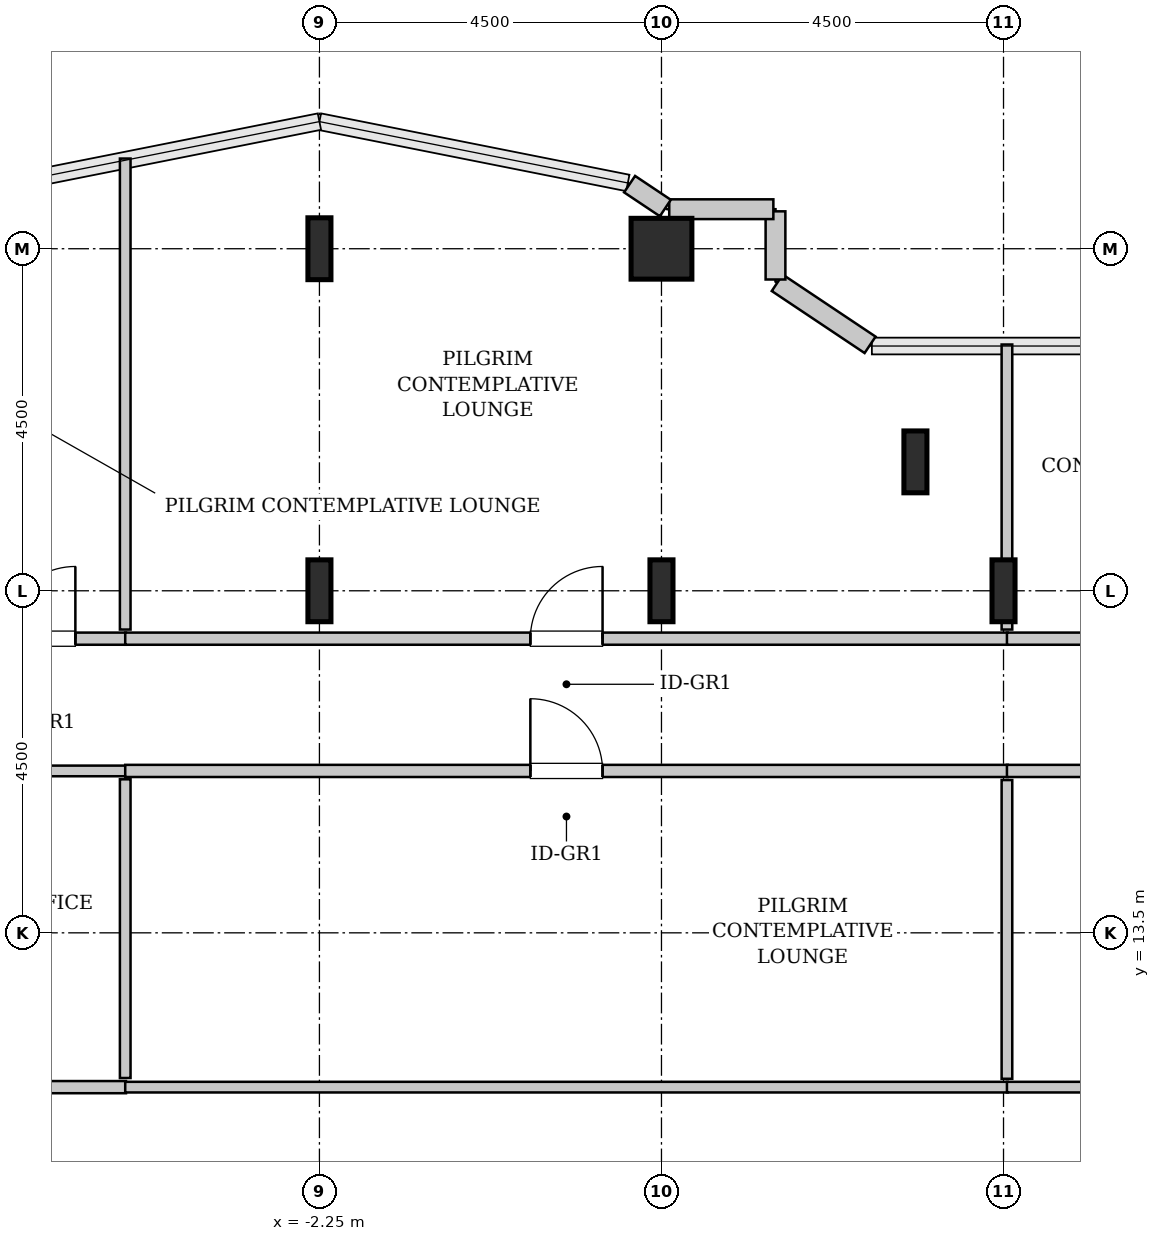
"""IFC4 building model, lengths in metres.
Left out: names, types, materials, properties, quantities, classifications, styles, units other than length and angle.
Written with IfcOpenShell. Run it as: python <this file> out.ifc"""

import sys

from ifc_helpers import new_model, si_unit, direction, frame, frame_2d, origin, origin_2d, place, context, subcontext, project, spatial, rectangle, hollow_rectangle, i_section, extrude, source, transform, mapped, element, fill, save


model = new_model("IFC4")
c1 = context("Model", 3, precision=1e-05, world=origin(), true_north=direction((0.0, 1.0)))
c2 = subcontext(c1, "Body", "Model", "MODEL_VIEW")
j1 = project(units=[si_unit("LENGTHUNIT", "METRE"), si_unit("PLANEANGLEUNIT", "RADIAN")], contexts=[c1])
p1 = place(None, origin())
s1 = spatial("IfcSite", under=j1, at=p1, CompositionType="ELEMENT")
p2 = place(p1, origin())
s2 = spatial("IfcBuilding", under=s1, at=p2, CompositionType="ELEMENT")
p3 = place(p2, frame((0.0, 0.0, 160.2)))
s3 = spatial("IfcBuildingStorey", under=s2, at=p3, CompositionType="ELEMENT", Elevation=160.2)
m1 = source(origin(), c2, "Body", "SweptSolid", [
    extrude(i_section(OverallWidth=0.303, OverallDepth=0.814, WebThickness=0.021, FlangeThickness=0.04, FilletRadius=0.03, at=origin_2d()), origin(), (0.0, 0.0, 1.0), 3.8),
])
for number, where, z_axis, x_axis in (
    (1, (-2.25, 18.0, 0.0), (0.0, 0.0, 1.0), (1.0, 0.0, 0.0)),
    (2, (-2.25, 22.5, 0.0), (0.0, 0.0, 1.0), (1.0, 0.0, 0.0)),
    (3, (2.25, 18.0, 0.0), (0.0, 0.0, 1.0), (1.0, 0.0, 0.0)),
):
    element("IfcColumn", number, at=place(p3, frame(where, z_axis=z_axis, x_axis=x_axis)), inside=s3, PredefinedType="COLUMN", context=c2, shape_type="MappedRepresentation", body=[
        mapped(m1, transform((0.0, 0.0, 0.0), x_axis=(1.0, 0.0, 0.0), y_axis=(0.0, 1.0, 0.0), z_axis=(0.0, 0.0, 1.0), scale=1.0)),
    ])
m2 = source(origin(), c2, "Body", "SweptSolid", [
    extrude(hollow_rectangle(XDim=0.8, YDim=0.8, WallThickness=0.04, InnerFilletRadius=0.04, OuterFilletRadius=0.08, at=origin_2d()), origin(), (0.0, 0.0, 1.0), 3.8),
])
p4 = place(p3, frame((2.25, 22.5, 0.0), z_axis=(0.0, 0.0, 1.0), x_axis=(1.0, 0.0, 0.0)))
e4 = element("IfcColumn", 4, at=p4, inside=s3, PredefinedType="COLUMN", context=c2, shape_type="MappedRepresentation", body=[
    mapped(m2, transform((0.0, 0.0, 0.0), x_axis=(1.0, 0.0, 0.0), y_axis=(0.0, 1.0, 0.0), z_axis=(0.0, 0.0, 1.0), scale=1.0)),
])
for number, where, z_axis, x_axis in (
    (5, (5.591, 19.696, 0.0), (0.0, 0.0, 1.0), (1.0, 0.0, 0.0)),
    (6, (6.75, 18.0, 0.0), (0.0, 0.0, 1.0), (1.0, 0.0, 0.0)),
):
    element("IfcColumn", number, at=place(p3, frame(where, z_axis=z_axis, x_axis=x_axis)), inside=s3, PredefinedType="COLUMN", context=c2, shape_type="MappedRepresentation", body=[
        mapped(m1, transform((0.0, 0.0, 0.0), x_axis=(1.0, 0.0, 0.0), y_axis=(0.0, 1.0, 0.0), z_axis=(0.0, 0.0, 1.0), scale=1.0)),
    ])
m3 = source(origin(), c2, "Body", "SweptSolid", [
    extrude(rectangle(XDim=1.469, YDim=0.26, at=frame_2d((0.734, 0.0))), origin(), (0.0, 0.0, 1.0), 3.55),
])
p5 = place(p3, frame((4.995, 21.236, 0.0), z_axis=(0.0, 0.0, 1.0), x_axis=(-0.831461760506, 0.555581983884, 0.0)))
e7 = element("IfcWall", 7, at=p5, inside=s3, PredefinedType="SOLIDWALL", context=c2, shape_type="MappedRepresentation", body=[
    mapped(m3, transform((0.0, 0.0, 0.0), x_axis=(1.0, 0.0, 0.0), y_axis=(0.0, 1.0, 0.0), z_axis=(0.0, 0.0, 1.0), scale=1.0)),
])
m4 = source(origin(), c2, "Body", "SweptSolid", [
    extrude(rectangle(XDim=0.897, YDim=0.26, at=frame_2d((0.448, 0.0))), origin(), (0.0, 0.0, 1.0), 3.55),
])
p6 = place(p3, frame((3.75, 22.095, 0.0), z_axis=(0.0, 0.0, 1.0), x_axis=(0.0, 1.0, 0.0)))
e8 = element("IfcWall", 8, at=p6, inside=s3, PredefinedType="SOLIDWALL", context=c2, shape_type="MappedRepresentation", body=[
    mapped(m4, transform((0.0, 0.0, 0.0), x_axis=(1.0, 0.0, 0.0), y_axis=(0.0, 1.0, 0.0), z_axis=(0.0, 0.0, 1.0), scale=1.0)),
])
m5 = source(origin(), c2, "Body", "SweptSolid", [
    extrude(rectangle(XDim=1.37, YDim=0.26, at=frame_2d((0.685, 0.0))), origin(), (0.0, 0.0, 1.0), 3.55),
])
p7 = place(p3, frame((3.722, 23.02, 0.0), z_axis=(0.0, 0.0, 1.0), x_axis=(-1.0, 0.0, 0.0)))
e9 = element("IfcWall", 9, at=p7, inside=s3, PredefinedType="SOLIDWALL", context=c2, shape_type="MappedRepresentation", body=[
    mapped(m5, transform((0.0, 0.0, 0.0), x_axis=(1.0, 0.0, 0.0), y_axis=(0.0, 1.0, 0.0), z_axis=(0.0, 0.0, 1.0), scale=1.0)),
])
m6 = source(origin(), c2, "Body", "SweptSolid", [
    extrude(rectangle(XDim=0.565, YDim=0.26, at=frame_2d((0.283, 0.0))), origin(), (0.0, 0.0, 1.0), 3.55),
])
p8 = place(p3, frame((2.301, 23.036, 0.0), z_axis=(0.0, 0.0, 1.0), x_axis=(-0.831651492666, 0.555297933317, 0.0)))
e10 = element("IfcWall", 10, at=p8, inside=s3, PredefinedType="SOLIDWALL", context=c2, shape_type="MappedRepresentation", body=[
    mapped(m6, transform((0.0, 0.0, 0.0), x_axis=(1.0, 0.0, 0.0), y_axis=(0.0, 1.0, 0.0), z_axis=(0.0, 0.0, 1.0), scale=1.0)),
])
m7 = source(origin(), c2, "Body", "SweptSolid", [
    extrude(rectangle(XDim=7.215, YDim=0.16, at=frame_2d((3.607, 0.0))), origin(), (0.0, 0.0, 1.0), 3.535),
])
p9 = place(p3, frame((-12.01, 11.47, 0.0), z_axis=(0.0, 0.0, 1.0), x_axis=(1.0, 0.0, 0.0)))
e11 = element("IfcWall", 11, at=p9, inside=s3, PredefinedType="PARTITIONING", context=c2, shape_type="MappedRepresentation", body=[
    mapped(m7, transform((0.0, 0.0, 0.0), x_axis=(1.0, 0.0, 0.0), y_axis=(0.0, 1.0, 0.0), z_axis=(0.0, 0.0, 1.0), scale=1.0)),
])
p10 = place(p9, frame((3.133, 0.0, 0.0)))
e12 = element("IfcOpeningElement", 12, at=p10, cuts=e11, PredefinedType="OPENING", context=c2, shape_type="SweptSolid", body=[
    extrude(rectangle(XDim=0.95, YDim=2.1, at=frame_2d((0.475, 1.05))), frame((0.0, 0.09, 0.0), z_axis=(0.0, -1.0, 0.0), x_axis=(1.0, 0.0, 0.0)), (0.0, 0.0, 1.0), 0.18),
])
m8 = source(origin(), c2, "Body", "SweptSolid", [
    extrude(rectangle(XDim=7.215, YDim=0.14, at=frame_2d((3.607, 0.0))), origin(), (0.0, 0.0, 1.0), 3.535),
])
p11 = place(p3, frame((-12.01, 15.63, 0.0), z_axis=(0.0, 0.0, 1.0), x_axis=(1.0, 0.0, 0.0)))
e13 = element("IfcWall", 13, at=p11, inside=s3, PredefinedType="PARTITIONING", context=c2, shape_type="MappedRepresentation", body=[
    mapped(m8, transform((0.0, 0.0, 0.0), x_axis=(1.0, 0.0, 0.0), y_axis=(0.0, 1.0, 0.0), z_axis=(0.0, 0.0, 1.0), scale=1.0)),
])
m9 = source(origin(), c2, "Body", "SweptSolid", [
    extrude(rectangle(XDim=3.93, YDim=0.14, at=frame_2d((1.965, 0.0))), origin(), (0.0, 0.0, 1.0), 3.535),
])
p12 = place(p3, frame((-4.805, 11.59, 0.0), z_axis=(0.0, 0.0, 1.0), x_axis=(0.0, 1.0, 0.0)))
e14 = element("IfcWall", 14, at=p12, inside=s3, PredefinedType="PARTITIONING", context=c2, shape_type="MappedRepresentation", body=[
    mapped(m9, transform((0.0, 0.0, 0.0), x_axis=(1.0, 0.0, 0.0), y_axis=(0.0, 1.0, 0.0), z_axis=(0.0, 0.0, 1.0), scale=1.0)),
])
m10 = source(origin(), c2, "Body", "SweptSolid", [
    extrude(rectangle(XDim=2.645, YDim=0.16, at=frame_2d((1.323, 0.0))), origin(), (0.0, 0.0, 1.0), 3.535),
])
p13 = place(p3, frame((-7.44, 17.37, 0.0), z_axis=(0.0, 0.0, 1.0), x_axis=(1.0, 0.0, 0.0)))
e15 = element("IfcWall", 15, at=p13, inside=s3, PredefinedType="PARTITIONING", context=c2, shape_type="MappedRepresentation", body=[
    mapped(m10, transform((0.0, 0.0, 0.0), x_axis=(1.0, 0.0, 0.0), y_axis=(0.0, 1.0, 0.0), z_axis=(0.0, 0.0, 1.0), scale=1.0)),
])
p14 = place(p13, frame((1.029, 0.0, 0.0)))
e16 = element("IfcOpeningElement", 16, at=p14, cuts=e15, PredefinedType="OPENING", context=c2, shape_type="SweptSolid", body=[
    extrude(rectangle(XDim=0.95, YDim=2.1, at=frame_2d((0.475, 1.05))), frame((0.0, 0.09, 0.0), z_axis=(0.0, -1.0, 0.0), x_axis=(1.0, 0.0, 0.0)), (0.0, 0.0, 1.0), 0.18),
])
m11 = source(origin(), c2, "Body", "SweptSolid", [
    extrude(rectangle(XDim=6.197, YDim=0.14, at=frame_2d((3.098, 0.0))), origin(), (0.0, 0.0, 1.0), 3.535),
])
p15 = place(p3, frame((-4.805, 17.49, 0.0), z_axis=(0.0, 0.0, 1.0), x_axis=(0.0, 1.0, 0.0)))
e17 = element("IfcWall", 17, at=p15, inside=s3, PredefinedType="PARTITIONING", context=c2, shape_type="MappedRepresentation", body=[
    mapped(m11, transform((0.0, 0.0, 0.0), x_axis=(1.0, 0.0, 0.0), y_axis=(0.0, 1.0, 0.0), z_axis=(0.0, 0.0, 1.0), scale=1.0)),
])
m12 = source(origin(), c2, "Body", "SweptSolid", [
    extrude(rectangle(XDim=11.61, YDim=0.16, at=frame_2d((5.805, 0.0))), origin(), (0.0, 0.0, 1.0), 3.535),
])
p16 = place(p3, frame((-4.805, 17.37, 0.0), z_axis=(0.0, 0.0, 1.0), x_axis=(1.0, 0.0, 0.0)))
e18 = element("IfcWall", 18, at=p16, inside=s3, PredefinedType="PARTITIONING", context=c2, shape_type="MappedRepresentation", body=[
    mapped(m12, transform((0.0, 0.0, 0.0), x_axis=(1.0, 0.0, 0.0), y_axis=(0.0, 1.0, 0.0), z_axis=(0.0, 0.0, 1.0), scale=1.0)),
])
p17 = place(p16, frame((5.33, 0.0, 0.0)))
e19 = element("IfcOpeningElement", 19, at=p17, cuts=e18, PredefinedType="OPENING", context=c2, shape_type="SweptSolid", body=[
    extrude(rectangle(XDim=0.95, YDim=2.1, at=frame_2d((0.475, 1.05))), frame((0.0, 0.09, 0.0), z_axis=(0.0, -1.0, 0.0), x_axis=(1.0, 0.0, 0.0)), (0.0, 0.0, 1.0), 0.18),
])
m13 = source(origin(), c2, "Body", "SweptSolid", [
    extrude(rectangle(XDim=3.75, YDim=0.14, at=frame_2d((1.875, 0.0))), origin(), (0.0, 0.0, 1.0), 3.535),
])
p18 = place(p3, frame((6.795, 17.49, 0.0), z_axis=(0.0, 0.0, 1.0), x_axis=(0.0, 1.0, 0.0)))
e20 = element("IfcWall", 20, at=p18, inside=s3, PredefinedType="PARTITIONING", context=c2, shape_type="MappedRepresentation", body=[
    mapped(m13, transform((0.0, 0.0, 0.0), x_axis=(1.0, 0.0, 0.0), y_axis=(0.0, 1.0, 0.0), z_axis=(0.0, 0.0, 1.0), scale=1.0)),
])
p19 = place(p3, frame((-4.805, 15.63, 0.0), z_axis=(0.0, 0.0, 1.0), x_axis=(1.0, 0.0, 0.0)))
e21 = element("IfcWall", 21, at=p19, inside=s3, PredefinedType="PARTITIONING", context=c2, shape_type="MappedRepresentation", body=[
    mapped(m12, transform((0.0, 0.0, 0.0), x_axis=(1.0, 0.0, 0.0), y_axis=(0.0, 1.0, 0.0), z_axis=(0.0, 0.0, 1.0), scale=1.0)),
])
p20 = place(p19, frame((5.33, 0.0, 0.0)))
e22 = element("IfcOpeningElement", 22, at=p20, cuts=e21, PredefinedType="OPENING", context=c2, shape_type="SweptSolid", body=[
    extrude(rectangle(XDim=0.95, YDim=2.1, at=frame_2d((0.475, 1.05))), frame((0.0, 0.09, 0.0), z_axis=(0.0, -1.0, 0.0), x_axis=(1.0, 0.0, 0.0)), (0.0, 0.0, 1.0), 0.18),
])
m14 = source(origin(), c2, "Body", "SweptSolid", [
    extrude(rectangle(XDim=11.61, YDim=0.14, at=frame_2d((5.805, 0.0))), origin(), (0.0, 0.0, 1.0), 3.535),
])
p21 = place(p3, frame((-4.805, 11.47, 0.0), z_axis=(0.0, 0.0, 1.0), x_axis=(1.0, 0.0, 0.0)))
e23 = element("IfcWall", 23, at=p21, inside=s3, PredefinedType="PARTITIONING", context=c2, shape_type="MappedRepresentation", body=[
    mapped(m14, transform((0.0, 0.0, 0.0), x_axis=(1.0, 0.0, 0.0), y_axis=(0.0, 1.0, 0.0), z_axis=(0.0, 0.0, 1.0), scale=1.0)),
])
p22 = place(p3, frame((6.795, 11.58, 0.0), z_axis=(0.0, 0.0, 1.0), x_axis=(0.0, 1.0, 0.0)))
e24 = element("IfcWall", 24, at=p22, inside=s3, PredefinedType="PARTITIONING", context=c2, shape_type="MappedRepresentation", body=[
    mapped(m9, transform((0.0, 0.0, 0.0), x_axis=(1.0, 0.0, 0.0), y_axis=(0.0, 1.0, 0.0), z_axis=(0.0, 0.0, 1.0), scale=1.0)),
])
m15 = source(origin(), c2, "Body", "SweptSolid", [
    extrude(rectangle(XDim=6.825, YDim=0.16, at=frame_2d((3.413, 0.0))), origin(), (0.0, 0.0, 1.0), 3.535),
])
p23 = place(p3, frame((6.795, 17.37, 0.0), z_axis=(0.0, 0.0, 1.0), x_axis=(1.0, 0.0, 0.0)))
e25 = element("IfcWall", 25, at=p23, inside=s3, PredefinedType="PARTITIONING", context=c2, shape_type="MappedRepresentation", body=[
    mapped(m15, transform((0.0, 0.0, 0.0), x_axis=(1.0, 0.0, 0.0), y_axis=(0.0, 1.0, 0.0), z_axis=(0.0, 0.0, 1.0), scale=1.0)),
])
p24 = place(p23, frame((2.938, 0.0, 0.0)))
e26 = element("IfcOpeningElement", 26, at=p24, cuts=e25, PredefinedType="OPENING", context=c2, shape_type="SweptSolid", body=[
    extrude(rectangle(XDim=0.95, YDim=2.1, at=frame_2d((0.475, 1.05))), frame((0.0, 0.09, 0.0), z_axis=(0.0, -1.0, 0.0), x_axis=(1.0, 0.0, 0.0)), (0.0, 0.0, 1.0), 0.18),
])
m16 = source(origin(), c2, "Body", "SweptSolid", [
    extrude(rectangle(XDim=5.215, YDim=0.16, at=frame_2d((2.607, 0.0))), origin(), (0.0, 0.0, 1.0), 3.535),
])
p25 = place(p3, frame((6.795, 15.63, 0.0), z_axis=(0.0, 0.0, 1.0), x_axis=(1.0, 0.0, 0.0)))
e27 = element("IfcWall", 27, at=p25, inside=s3, PredefinedType="PARTITIONING", context=c2, shape_type="MappedRepresentation", body=[
    mapped(m16, transform((0.0, 0.0, 0.0), x_axis=(1.0, 0.0, 0.0), y_axis=(0.0, 1.0, 0.0), z_axis=(0.0, 0.0, 1.0), scale=1.0)),
])
p26 = place(p25, frame((2.133, 0.0, 0.0)))
e28 = element("IfcOpeningElement", 28, at=p26, cuts=e27, PredefinedType="OPENING", context=c2, shape_type="SweptSolid", body=[
    extrude(rectangle(XDim=0.95, YDim=2.1, at=frame_2d((0.475, 1.05))), frame((0.0, 0.09, 0.0), z_axis=(0.0, -1.0, 0.0), x_axis=(1.0, 0.0, 0.0)), (0.0, 0.0, 1.0), 0.18),
])
m17 = source(origin(), c2, "Body", "SweptSolid", [
    extrude(rectangle(XDim=5.215, YDim=0.14, at=frame_2d((2.607, 0.0))), origin(), (0.0, 0.0, 1.0), 3.535),
])
p27 = place(p3, frame((6.795, 11.47, 0.0), z_axis=(0.0, 0.0, 1.0), x_axis=(1.0, 0.0, 0.0)))
e29 = element("IfcWall", 29, at=p27, inside=s3, PredefinedType="PARTITIONING", context=c2, shape_type="MappedRepresentation", body=[
    mapped(m17, transform((0.0, 0.0, 0.0), x_axis=(1.0, 0.0, 0.0), y_axis=(0.0, 1.0, 0.0), z_axis=(0.0, 0.0, 1.0), scale=1.0)),
])
m18 = source(origin(), c2, "Body", "SweptSolid", [
    extrude(rectangle(XDim=0.95, YDim=2.1, at=frame_2d((0.475, 1.05))), frame((0.0, 0.025, 0.0), z_axis=(0.0, -1.0, 0.0), x_axis=(1.0, 0.0, 0.0)), (0.0, 0.0, 1.0), 0.05),
])
p28 = place(p14, origin())
e30 = element("IfcDoor", 30, at=p28, inside=s3, OperationType="SINGLE_SWING_RIGHT", PredefinedType="DOOR", context=c2, shape_type="MappedRepresentation", body=[
    mapped(m18, transform((0.0, 0.0, 0.0), x_axis=(1.0, 0.0, 0.0), y_axis=(0.0, 1.0, 0.0), z_axis=(0.0, 0.0, 1.0), scale=1.0)),
])
fill(e16, e30)
p29 = place(p17, origin())
e31 = element("IfcDoor", 31, at=p29, inside=s3, OperationType="SINGLE_SWING_RIGHT", PredefinedType="DOOR", context=c2, shape_type="MappedRepresentation", body=[
    mapped(m18, transform((0.0, 0.0, 0.0), x_axis=(1.0, 0.0, 0.0), y_axis=(0.0, 1.0, 0.0), z_axis=(0.0, 0.0, 1.0), scale=1.0)),
])
fill(e19, e31)
p30 = place(p20, origin())
e32 = element("IfcDoor", 32, at=p30, inside=s3, OperationType="SINGLE_SWING_LEFT", PredefinedType="DOOR", context=c2, shape_type="MappedRepresentation", body=[
    mapped(m18, transform((0.0, 0.0, 0.0), x_axis=(1.0, 0.0, 0.0), y_axis=(0.0, 1.0, 0.0), z_axis=(0.0, 0.0, 1.0), scale=1.0)),
])
fill(e22, e32)
save(model, sys.argv[1])
